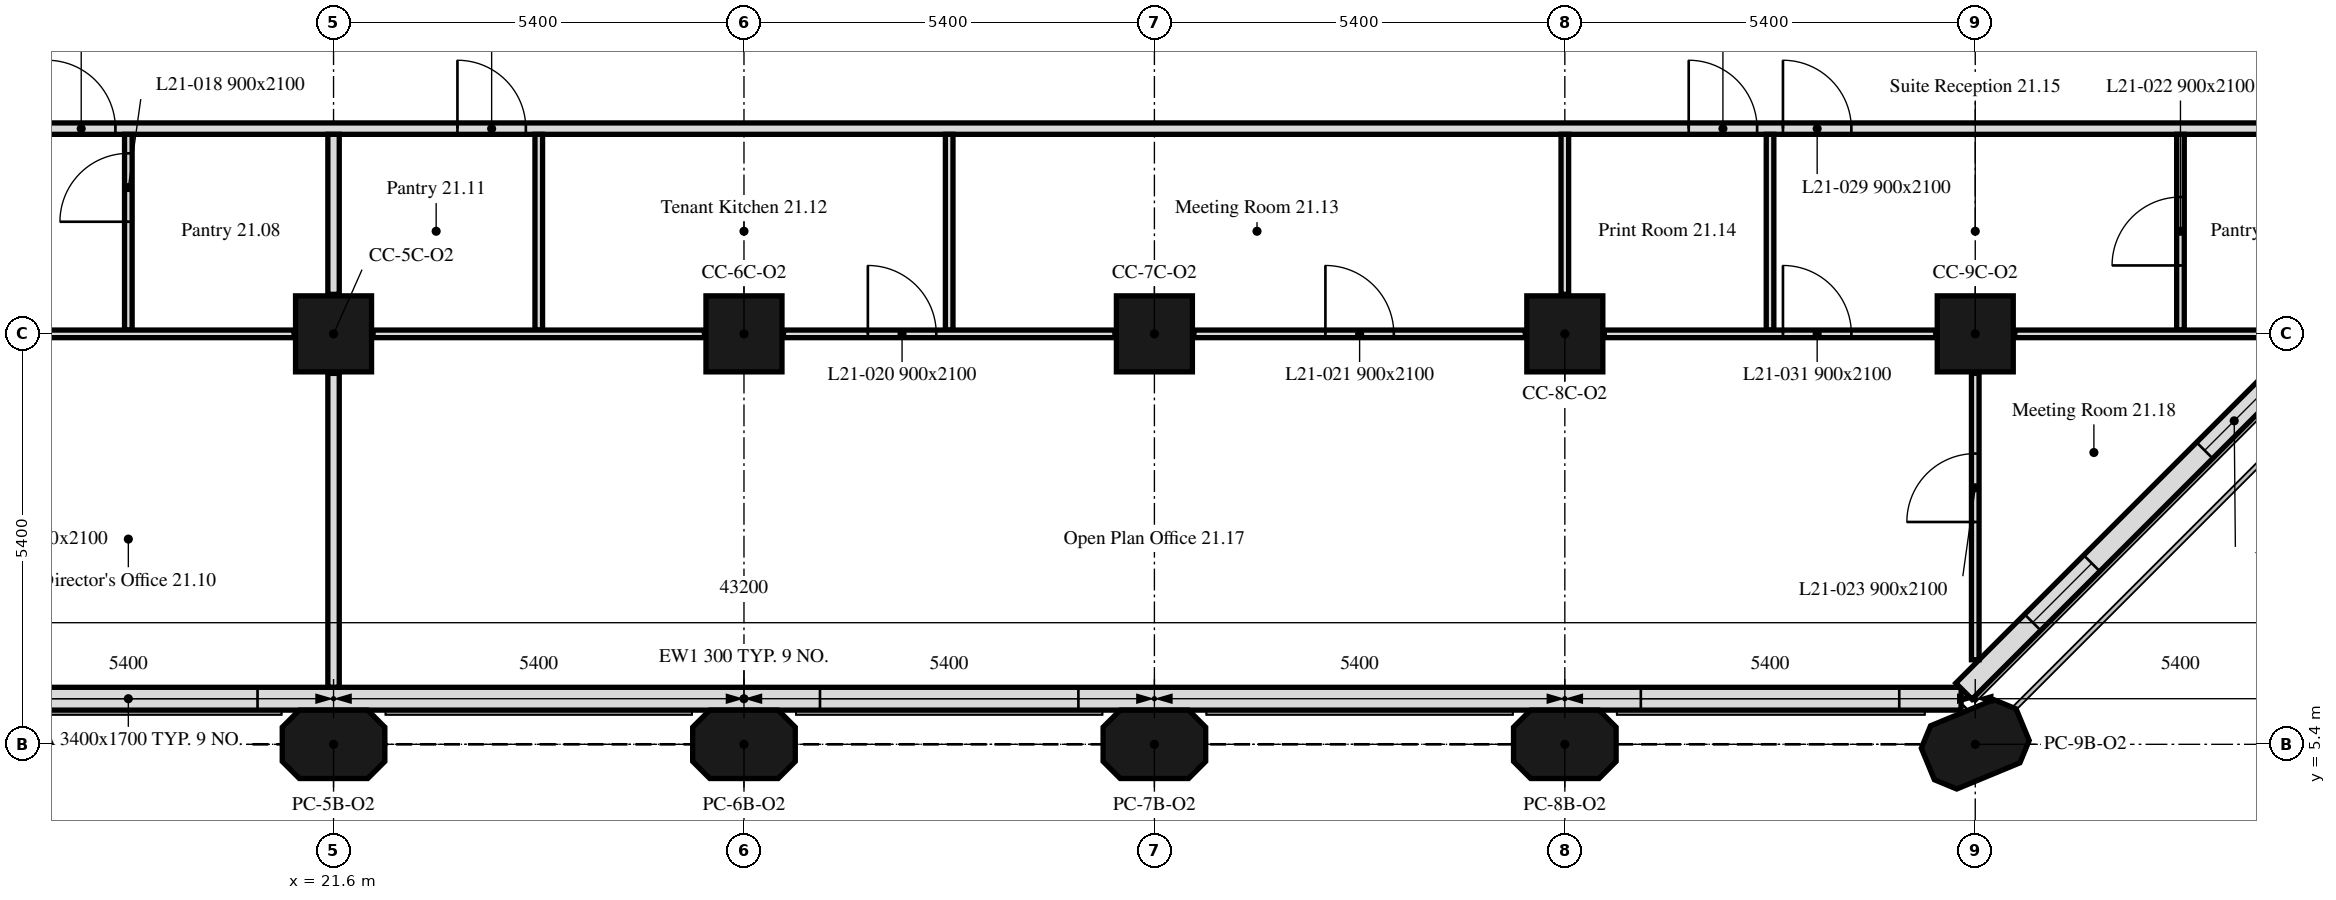
"""IFC4 building model, lengths in metres.
Left out: names, types, materials, properties, quantities, classifications, styles, units other than length and angle.
Written with IfcOpenShell. Run it as: python <this file> out.ifc"""

import sys

from ifc_helpers import new_model, si_unit, direction, frame, frame_2d, origin, origin_2d, place, context, subcontext, project, spatial, polyline, rectangle, outline, extrude, element, fill, save


model = new_model("IFC4")
c1 = context("Model", 3, precision=1e-05, world=origin(), true_north=direction((0.0, 1.0)))
c2 = subcontext(c1, "Body", "Model", "MODEL_VIEW")
j1 = project(units=[si_unit("LENGTHUNIT", "METRE"), si_unit("PLANEANGLEUNIT", "RADIAN")], contexts=[c1])
p1 = place(None, origin())
s1 = spatial("IfcSite", under=j1, at=p1, CompositionType="ELEMENT")
p2 = place(p1, origin())
s2 = spatial("IfcBuilding", under=s1, at=p2, CompositionType="ELEMENT")
p3 = place(p2, frame((0.0, 0.0, 91.6)))
s3 = spatial("IfcBuildingStorey", under=s2, at=p3, CompositionType="ELEMENT", Elevation=91.6)
for number, where, z_axis, x_axis in (
    (1, (21.6, 5.4, 0.0), (0.0, 0.0, 1.0), (1.0, 0.0, 0.0)),
    (2, (27.0, 5.4, 0.0), (0.0, 0.0, 1.0), (1.0, 0.0, 0.0)),
    (3, (32.4, 5.4, 0.0), (0.0, 0.0, 1.0), (1.0, 0.0, 0.0)),
    (4, (37.8, 5.4, 0.0), (0.0, 0.0, 1.0), (1.0, 0.0, 0.0)),
    (5, (43.2, 5.4, 0.0), (0.0, 0.0, 1.0), (0.924, 0.383, 0.0)),
):
    element("IfcColumn", number, at=place(p3, frame(where, z_axis=z_axis, x_axis=x_axis)), inside=s3, PredefinedType="COLUMN", context=c2, shape_type="SweptSolid", body=[
        extrude(outline(polyline([(-0.45, -0.45), (0.45, -0.45), (0.675, -0.225), (0.675, 0.225), (0.45, 0.45), (-0.45, 0.45), (-0.675, 0.225), (-0.675, -0.225), (-0.45, -0.45)])), origin(), (0.0, 0.0, 1.0), 3.5),
    ])
for number, where, z_axis, x_axis in (
    (6, (21.6, 10.8, 0.0), (0.0, 0.0, 1.0), (1.0, 0.0, 0.0)),
    (7, (27.0, 10.8, 0.0), (0.0, 0.0, 1.0), (1.0, 0.0, 0.0)),
    (8, (32.4, 10.8, 0.0), (0.0, 0.0, 1.0), (1.0, 0.0, 0.0)),
    (9, (37.8, 10.8, 0.0), (0.0, 0.0, 1.0), (1.0, 0.0, 0.0)),
    (10, (43.2, 10.8, 0.0), (0.0, 0.0, 1.0), (1.0, 0.0, 0.0)),
):
    element("IfcColumn", number, at=place(p3, frame(where, z_axis=z_axis, x_axis=x_axis)), inside=s3, PredefinedType="COLUMN", context=c2, shape_type="SweptSolid", body=[
        extrude(rectangle(XDim=1.0, YDim=1.0, at=origin_2d()), origin(), (0.0, 0.0, 1.0), 3.5),
    ])
p4 = place(p3, frame((10.986, 6.0, 0.0), z_axis=(0.0, 0.0, 1.0), x_axis=(1.0, 0.0, 0.0)))
e11 = element("IfcWall", 11, at=p4, inside=s3, PredefinedType="SOLIDWALL", context=c2, shape_type="SweptSolid", body=[
    extrude(rectangle(XDim=32.027, YDim=0.3, at=frame_2d((16.014, 0.0))), origin(), (0.0, 0.0, 1.0), 3.5),
])
p5 = place(p4, frame((6.214, 0.0, 0.9)))
e12 = element("IfcOpeningElement", 12, at=p5, cuts=e11, PredefinedType="OPENING", context=c2, shape_type="SweptSolid", body=[
    extrude(rectangle(XDim=3.4, YDim=1.7, at=frame_2d((1.7, 0.85))), frame((0.0, 0.16, 0.0), z_axis=(0.0, -1.0, 0.0), x_axis=(1.0, 0.0, 0.0)), (0.0, 0.0, 1.0), 0.32),
])
p6 = place(p4, frame((17.014, 0.0, 0.9)))
e13 = element("IfcOpeningElement", 13, at=p6, cuts=e11, PredefinedType="OPENING", context=c2, shape_type="SweptSolid", body=[
    extrude(rectangle(XDim=3.4, YDim=1.7, at=frame_2d((1.7, 0.85))), frame((0.0, 0.16, 0.0), z_axis=(0.0, -1.0, 0.0), x_axis=(1.0, 0.0, 0.0)), (0.0, 0.0, 1.0), 0.32),
])
p7 = place(p4, frame((27.814, 0.0, 0.9)))
e14 = element("IfcOpeningElement", 14, at=p7, cuts=e11, PredefinedType="OPENING", context=c2, shape_type="SweptSolid", body=[
    extrude(rectangle(XDim=3.4, YDim=1.7, at=frame_2d((1.7, 0.85))), frame((0.0, 0.16, 0.0), z_axis=(0.0, -1.0, 0.0), x_axis=(1.0, 0.0, 0.0)), (0.0, 0.0, 1.0), 0.32),
])
p8 = place(p3, frame((43.051, 6.099, 0.0), z_axis=(0.0, 0.0, 1.0), x_axis=(0.707106781187, 0.707106781187, 0.0)))
e15 = element("IfcWall", 15, at=p8, inside=s3, PredefinedType="SOLIDWALL", context=c2, shape_type="SweptSolid", body=[
    extrude(rectangle(XDim=6.86, YDim=0.3, at=frame_2d((3.43, 0.0))), origin(), (0.0, 0.0, 1.0), 3.5),
])
p9 = place(p8, frame((1.28, 0.0, 0.9)))
e16 = element("IfcOpeningElement", 16, at=p9, cuts=e15, PredefinedType="OPENING", context=c2, shape_type="SweptSolid", body=[
    extrude(rectangle(XDim=1.1, YDim=1.7, at=frame_2d((0.55, 0.85))), frame((0.0, 0.16, 0.0), z_axis=(0.0, -1.0, 0.0), x_axis=(1.0, 0.0, 0.0)), (0.0, 0.0, 1.0), 0.32),
])
p10 = place(p8, frame((4.48, 0.0, 0.9)))
e17 = element("IfcOpeningElement", 17, at=p10, cuts=e15, PredefinedType="OPENING", context=c2, shape_type="SweptSolid", body=[
    extrude(rectangle(XDim=1.1, YDim=1.7, at=frame_2d((0.55, 0.85))), frame((0.0, 0.16, 0.0), z_axis=(0.0, -1.0, 0.0), x_axis=(1.0, 0.0, 0.0)), (0.0, 0.0, 1.0), 0.32),
])
p11 = place(p3, frame((6.151, 13.5, 0.0), z_axis=(0.0, 0.0, 1.0), x_axis=(1.0, 0.0, 0.0)))
e18 = element("IfcWall", 18, at=p11, inside=s3, PredefinedType="PARTITIONING", context=c2, shape_type="SweptSolid", body=[
    extrude(rectangle(XDim=41.698, YDim=0.15, at=frame_2d((20.849, 0.0))), origin(), (0.0, 0.0, 1.0), 3.5),
])
p12 = place(p11, frame((0.879, 0.0, 0.0)))
e19 = element("IfcOpeningElement", 19, at=p12, cuts=e18, PredefinedType="OPENING", context=c2, shape_type="SweptSolid", body=[
    extrude(rectangle(XDim=0.9, YDim=2.1, at=frame_2d((0.45, 1.05))), frame((0.0, 0.075, 0.0), z_axis=(0.0, -1.0, 0.0), x_axis=(1.0, 0.0, 0.0)), (0.0, 0.0, 1.0), 0.15),
])
p13 = place(p11, frame((17.079, 0.0, 0.0)))
e20 = element("IfcOpeningElement", 20, at=p13, cuts=e18, PredefinedType="OPENING", context=c2, shape_type="SweptSolid", body=[
    extrude(rectangle(XDim=0.9, YDim=2.1, at=frame_2d((0.45, 1.05))), frame((0.0, 0.075, 0.0), z_axis=(0.0, -1.0, 0.0), x_axis=(1.0, 0.0, 0.0)), (0.0, 0.0, 1.0), 0.15),
])
p14 = place(p11, frame((33.279, 0.0, 0.0)))
e21 = element("IfcOpeningElement", 21, at=p14, cuts=e18, PredefinedType="OPENING", context=c2, shape_type="SweptSolid", body=[
    extrude(rectangle(XDim=0.9, YDim=2.1, at=frame_2d((0.45, 1.05))), frame((0.0, 0.075, 0.0), z_axis=(0.0, -1.0, 0.0), x_axis=(1.0, 0.0, 0.0)), (0.0, 0.0, 1.0), 0.15),
])
p15 = place(p11, frame((11.679, 0.0, 0.0)))
e22 = element("IfcOpeningElement", 22, at=p15, cuts=e18, PredefinedType="OPENING", context=c2, shape_type="SweptSolid", body=[
    extrude(rectangle(XDim=0.9, YDim=2.1, at=frame_2d((0.45, 1.05))), frame((0.0, 0.075, 0.0), z_axis=(0.0, -1.0, 0.0), x_axis=(1.0, 0.0, 0.0)), (0.0, 0.0, 1.0), 0.15),
])
p16 = place(p11, frame((34.519, 0.0, 0.0)))
e23 = element("IfcOpeningElement", 23, at=p16, cuts=e18, PredefinedType="OPENING", context=c2, shape_type="SweptSolid", body=[
    extrude(rectangle(XDim=0.9, YDim=2.1, at=frame_2d((0.45, 1.05))), frame((0.0, 0.075, 0.0), z_axis=(0.0, -1.0, 0.0), x_axis=(1.0, 0.0, 0.0)), (0.0, 0.0, 1.0), 0.15),
])
p17 = place(p3, frame((18.9, 10.85, 0.0), z_axis=(0.0, 0.0, 1.0), x_axis=(0.0, 1.0, 0.0)))
e24 = element("IfcWall", 24, at=p17, inside=s3, PredefinedType="PARTITIONING", context=c2, shape_type="SweptSolid", body=[
    extrude(rectangle(XDim=2.575, YDim=0.1, at=frame_2d((1.288, 0.0))), origin(), (0.0, 0.0, 1.0), 3.5),
])
p18 = place(p17, frame((1.425, 0.0, 0.0)))
e25 = element("IfcOpeningElement", 25, at=p18, cuts=e24, PredefinedType="OPENING", context=c2, shape_type="SweptSolid", body=[
    extrude(rectangle(XDim=0.9, YDim=2.1, at=frame_2d((0.45, 1.05))), frame((0.0, 0.05, 0.0), z_axis=(0.0, -1.0, 0.0), x_axis=(1.0, 0.0, 0.0)), (0.0, 0.0, 1.0), 0.1),
])
p19 = place(p3, frame((16.72, 10.8, 0.0), z_axis=(0.0, 0.0, 1.0), x_axis=(1.0, 0.0, 0.0)))
e26 = element("IfcWall", 26, at=p19, inside=s3, PredefinedType="PARTITIONING", context=c2, shape_type="SweptSolid", body=[
    extrude(rectangle(XDim=4.36, YDim=0.1, at=frame_2d((2.18, 0.0))), origin(), (0.0, 0.0, 1.0), 3.5),
])
p20 = place(p3, frame((21.6, 11.32, 0.0), z_axis=(0.0, 0.0, 1.0), x_axis=(0.0, 1.0, 0.0)))
e27 = element("IfcWall", 27, at=p20, inside=s3, PredefinedType="PARTITIONING", context=c2, shape_type="SweptSolid", body=[
    extrude(rectangle(XDim=2.105, YDim=0.15, at=frame_2d((1.052, 0.0))), origin(), (0.0, 0.0, 1.0), 3.5),
])
p21 = place(p3, frame((21.6, 6.151, 0.0), z_axis=(0.0, 0.0, 1.0), x_axis=(0.0, 1.0, 0.0)))
e28 = element("IfcWall", 28, at=p21, inside=s3, PredefinedType="PARTITIONING", context=c2, shape_type="SweptSolid", body=[
    extrude(rectangle(XDim=4.129, YDim=0.15, at=frame_2d((2.064, 0.0))), origin(), (0.0, 0.0, 1.0), 3.5),
])
p22 = place(p3, frame((24.3, 10.85, 0.0), z_axis=(0.0, 0.0, 1.0), x_axis=(0.0, 1.0, 0.0)))
e29 = element("IfcWall", 29, at=p22, inside=s3, PredefinedType="PARTITIONING", context=c2, shape_type="SweptSolid", body=[
    extrude(rectangle(XDim=2.575, YDim=0.1, at=frame_2d((1.288, 0.0))), origin(), (0.0, 0.0, 1.0), 3.5),
])
p23 = place(p3, frame((22.12, 10.8, 0.0), z_axis=(0.0, 0.0, 1.0), x_axis=(1.0, 0.0, 0.0)))
e30 = element("IfcWall", 30, at=p23, inside=s3, PredefinedType="PARTITIONING", context=c2, shape_type="SweptSolid", body=[
    extrude(rectangle(XDim=4.36, YDim=0.1, at=frame_2d((2.18, 0.0))), origin(), (0.0, 0.0, 1.0), 3.5),
])
p24 = place(p3, frame((29.7, 10.85, 0.0), z_axis=(0.0, 0.0, 1.0), x_axis=(0.0, 1.0, 0.0)))
e31 = element("IfcWall", 31, at=p24, inside=s3, PredefinedType="PARTITIONING", context=c2, shape_type="SweptSolid", body=[
    extrude(rectangle(XDim=2.575, YDim=0.1, at=frame_2d((1.288, 0.0))), origin(), (0.0, 0.0, 1.0), 3.5),
])
p25 = place(p3, frame((27.52, 10.8, 0.0), z_axis=(0.0, 0.0, 1.0), x_axis=(1.0, 0.0, 0.0)))
e32 = element("IfcWall", 32, at=p25, inside=s3, PredefinedType="PARTITIONING", context=c2, shape_type="SweptSolid", body=[
    extrude(rectangle(XDim=4.36, YDim=0.1, at=frame_2d((2.18, 0.0))), origin(), (0.0, 0.0, 1.0), 3.5),
])
p26 = place(p25, frame((1.11, 0.0, 0.0)))
e33 = element("IfcOpeningElement", 33, at=p26, cuts=e32, PredefinedType="OPENING", context=c2, shape_type="SweptSolid", body=[
    extrude(rectangle(XDim=0.9, YDim=2.1, at=frame_2d((0.45, 1.05))), frame((0.0, 0.05, 0.0), z_axis=(0.0, -1.0, 0.0), x_axis=(1.0, 0.0, 0.0)), (0.0, 0.0, 1.0), 0.1),
])
p27 = place(p3, frame((32.92, 10.8, 0.0), z_axis=(0.0, 0.0, 1.0), x_axis=(1.0, 0.0, 0.0)))
e34 = element("IfcWall", 34, at=p27, inside=s3, PredefinedType="PARTITIONING", context=c2, shape_type="SweptSolid", body=[
    extrude(rectangle(XDim=4.36, YDim=0.1, at=frame_2d((2.18, 0.0))), origin(), (0.0, 0.0, 1.0), 3.5),
])
p28 = place(p27, frame((1.73, 0.0, 0.0)))
e35 = element("IfcOpeningElement", 35, at=p28, cuts=e34, PredefinedType="OPENING", context=c2, shape_type="SweptSolid", body=[
    extrude(rectangle(XDim=0.9, YDim=2.1, at=frame_2d((0.45, 1.05))), frame((0.0, 0.05, 0.0), z_axis=(0.0, -1.0, 0.0), x_axis=(1.0, 0.0, 0.0)), (0.0, 0.0, 1.0), 0.1),
])
p29 = place(p3, frame((37.8, 11.32, 0.0), z_axis=(0.0, 0.0, 1.0), x_axis=(0.0, 1.0, 0.0)))
e36 = element("IfcWall", 36, at=p29, inside=s3, PredefinedType="PARTITIONING", context=c2, shape_type="SweptSolid", body=[
    extrude(rectangle(XDim=2.105, YDim=0.1, at=frame_2d((1.052, 0.0))), origin(), (0.0, 0.0, 1.0), 3.5),
])
p30 = place(p3, frame((40.5, 10.85, 0.0), z_axis=(0.0, 0.0, 1.0), x_axis=(0.0, 1.0, 0.0)))
e37 = element("IfcWall", 37, at=p30, inside=s3, PredefinedType="PARTITIONING", context=c2, shape_type="SweptSolid", body=[
    extrude(rectangle(XDim=2.575, YDim=0.1, at=frame_2d((1.288, 0.0))), origin(), (0.0, 0.0, 1.0), 3.5),
])
p31 = place(p3, frame((38.32, 10.8, 0.0), z_axis=(0.0, 0.0, 1.0), x_axis=(1.0, 0.0, 0.0)))
e38 = element("IfcWall", 38, at=p31, inside=s3, PredefinedType="PARTITIONING", context=c2, shape_type="SweptSolid", body=[
    extrude(rectangle(XDim=4.36, YDim=0.1, at=frame_2d((2.18, 0.0))), origin(), (0.0, 0.0, 1.0), 3.5),
])
p32 = place(p31, frame((2.35, 0.0, 0.0)))
e39 = element("IfcOpeningElement", 39, at=p32, cuts=e38, PredefinedType="OPENING", context=c2, shape_type="SweptSolid", body=[
    extrude(rectangle(XDim=0.9, YDim=2.1, at=frame_2d((0.45, 1.05))), frame((0.0, 0.05, 0.0), z_axis=(0.0, -1.0, 0.0), x_axis=(1.0, 0.0, 0.0)), (0.0, 0.0, 1.0), 0.1),
])
p33 = place(p3, frame((45.9, 10.85, 0.0), z_axis=(0.0, 0.0, 1.0), x_axis=(0.0, 1.0, 0.0)))
e40 = element("IfcWall", 40, at=p33, inside=s3, PredefinedType="PARTITIONING", context=c2, shape_type="SweptSolid", body=[
    extrude(rectangle(XDim=2.575, YDim=0.1, at=frame_2d((1.288, 0.0))), origin(), (0.0, 0.0, 1.0), 3.5),
])
p34 = place(p33, frame((0.85, 0.0, 0.0)))
e41 = element("IfcOpeningElement", 41, at=p34, cuts=e40, PredefinedType="OPENING", context=c2, shape_type="SweptSolid", body=[
    extrude(rectangle(XDim=0.9, YDim=2.1, at=frame_2d((0.45, 1.05))), frame((0.0, 0.05, 0.0), z_axis=(0.0, -1.0, 0.0), x_axis=(1.0, 0.0, 0.0)), (0.0, 0.0, 1.0), 0.1),
])
p35 = place(p3, frame((43.72, 10.8, 0.0), z_axis=(0.0, 0.0, 1.0), x_axis=(1.0, 0.0, 0.0)))
e42 = element("IfcWall", 42, at=p35, inside=s3, PredefinedType="PARTITIONING", context=c2, shape_type="SweptSolid", body=[
    extrude(rectangle(XDim=3.768, YDim=0.1, at=frame_2d((1.884, 0.0))), origin(), (0.0, 0.0, 1.0), 3.5),
])
p36 = place(p3, frame((43.2, 6.512, 0.0), z_axis=(0.0, 0.0, 1.0), x_axis=(0.0, 1.0, 0.0)))
e43 = element("IfcWall", 43, at=p36, inside=s3, PredefinedType="PARTITIONING", context=c2, shape_type="SweptSolid", body=[
    extrude(rectangle(XDim=3.768, YDim=0.1, at=frame_2d((1.884, 0.0))), origin(), (0.0, 0.0, 1.0), 3.5),
])
p37 = place(p36, frame((1.813, 0.0, 0.0)))
e44 = element("IfcOpeningElement", 44, at=p37, cuts=e43, PredefinedType="OPENING", context=c2, shape_type="SweptSolid", body=[
    extrude(rectangle(XDim=0.9, YDim=2.1, at=frame_2d((0.45, 1.05))), frame((0.0, 0.05, 0.0), z_axis=(0.0, -1.0, 0.0), x_axis=(1.0, 0.0, 0.0)), (0.0, 0.0, 1.0), 0.1),
])
p38 = place(p5, origin())
e45 = element("IfcWindow", 45, at=p38, inside=s3, PartitioningType="SINGLE_PANEL", PredefinedType="WINDOW", context=c2, shape_type="SweptSolid", body=[
    extrude(rectangle(XDim=3.4, YDim=1.7, at=frame_2d((1.7, 0.85))), frame((0.0, 0.03, 0.0), z_axis=(0.0, -1.0, 0.0), x_axis=(1.0, 0.0, 0.0)), (0.0, 0.0, 1.0), 0.06),
])
fill(e12, e45)
p39 = place(p6, origin())
e46 = element("IfcWindow", 46, at=p39, inside=s3, PartitioningType="SINGLE_PANEL", PredefinedType="WINDOW", context=c2, shape_type="SweptSolid", body=[
    extrude(rectangle(XDim=3.4, YDim=1.7, at=frame_2d((1.7, 0.85))), frame((0.0, 0.03, 0.0), z_axis=(0.0, -1.0, 0.0), x_axis=(1.0, 0.0, 0.0)), (0.0, 0.0, 1.0), 0.06),
])
fill(e13, e46)
p40 = place(p7, origin())
e47 = element("IfcWindow", 47, at=p40, inside=s3, PartitioningType="SINGLE_PANEL", PredefinedType="WINDOW", context=c2, shape_type="SweptSolid", body=[
    extrude(rectangle(XDim=3.4, YDim=1.7, at=frame_2d((1.7, 0.85))), frame((0.0, 0.03, 0.0), z_axis=(0.0, -1.0, 0.0), x_axis=(1.0, 0.0, 0.0)), (0.0, 0.0, 1.0), 0.06),
])
fill(e14, e47)
p41 = place(p9, origin())
e48 = element("IfcWindow", 48, at=p41, inside=s3, PartitioningType="SINGLE_PANEL", PredefinedType="WINDOW", context=c2, shape_type="SweptSolid", body=[
    extrude(rectangle(XDim=1.1, YDim=1.7, at=frame_2d((0.55, 0.85))), frame((0.0, 0.03, 0.0), z_axis=(0.0, -1.0, 0.0), x_axis=(1.0, 0.0, 0.0)), (0.0, 0.0, 1.0), 0.06),
])
fill(e16, e48)
p42 = place(p10, origin())
e49 = element("IfcWindow", 49, at=p42, inside=s3, PartitioningType="SINGLE_PANEL", PredefinedType="WINDOW", context=c2, shape_type="SweptSolid", body=[
    extrude(rectangle(XDim=1.1, YDim=1.7, at=frame_2d((0.55, 0.85))), frame((0.0, 0.03, 0.0), z_axis=(0.0, -1.0, 0.0), x_axis=(1.0, 0.0, 0.0)), (0.0, 0.0, 1.0), 0.06),
])
fill(e17, e49)
p43 = place(p13, origin())
e50 = element("IfcDoor", 50, at=p43, inside=s3, OperationType="SINGLE_SWING_RIGHT", PredefinedType="DOOR", context=c2, shape_type="SweptSolid", body=[
    extrude(rectangle(XDim=0.9, YDim=2.1, at=frame_2d((0.45, 1.05))), frame((0.0, 0.025, 0.0), z_axis=(0.0, -1.0, 0.0), x_axis=(1.0, 0.0, 0.0)), (0.0, 0.0, 1.0), 0.05),
])
fill(e20, e50)
p44 = place(p14, origin())
e51 = element("IfcDoor", 51, at=p44, inside=s3, OperationType="SINGLE_SWING_RIGHT", PredefinedType="DOOR", context=c2, shape_type="SweptSolid", body=[
    extrude(rectangle(XDim=0.9, YDim=2.1, at=frame_2d((0.45, 1.05))), frame((0.0, 0.025, 0.0), z_axis=(0.0, -1.0, 0.0), x_axis=(1.0, 0.0, 0.0)), (0.0, 0.0, 1.0), 0.05),
])
fill(e21, e51)
p45 = place(p18, origin())
e52 = element("IfcDoor", 52, at=p45, inside=s3, OperationType="SINGLE_SWING_RIGHT", PredefinedType="DOOR", context=c2, shape_type="SweptSolid", body=[
    extrude(rectangle(XDim=0.9, YDim=2.1, at=frame_2d((0.45, 1.05))), frame((0.0, 0.025, 0.0), z_axis=(0.0, -1.0, 0.0), x_axis=(1.0, 0.0, 0.0)), (0.0, 0.0, 1.0), 0.05),
])
fill(e25, e52)
p46 = place(p26, origin())
e53 = element("IfcDoor", 53, at=p46, inside=s3, OperationType="SINGLE_SWING_LEFT", PredefinedType="DOOR", context=c2, shape_type="SweptSolid", body=[
    extrude(rectangle(XDim=0.9, YDim=2.1, at=frame_2d((0.45, 1.05))), frame((0.0, 0.025, 0.0), z_axis=(0.0, -1.0, 0.0), x_axis=(1.0, 0.0, 0.0)), (0.0, 0.0, 1.0), 0.05),
])
fill(e33, e53)
p47 = place(p28, origin())
e54 = element("IfcDoor", 54, at=p47, inside=s3, OperationType="SINGLE_SWING_LEFT", PredefinedType="DOOR", context=c2, shape_type="SweptSolid", body=[
    extrude(rectangle(XDim=0.9, YDim=2.1, at=frame_2d((0.45, 1.05))), frame((0.0, 0.025, 0.0), z_axis=(0.0, -1.0, 0.0), x_axis=(1.0, 0.0, 0.0)), (0.0, 0.0, 1.0), 0.05),
])
fill(e35, e54)
p48 = place(p34, origin())
e55 = element("IfcDoor", 55, at=p48, inside=s3, OperationType="SINGLE_SWING_LEFT", PredefinedType="DOOR", context=c2, shape_type="SweptSolid", body=[
    extrude(rectangle(XDim=0.9, YDim=2.1, at=frame_2d((0.45, 1.05))), frame((0.0, 0.025, 0.0), z_axis=(0.0, -1.0, 0.0), x_axis=(1.0, 0.0, 0.0)), (0.0, 0.0, 1.0), 0.05),
])
fill(e41, e55)
p49 = place(p37, origin())
e56 = element("IfcDoor", 56, at=p49, inside=s3, OperationType="SINGLE_SWING_RIGHT", PredefinedType="DOOR", context=c2, shape_type="SweptSolid", body=[
    extrude(rectangle(XDim=0.9, YDim=2.1, at=frame_2d((0.45, 1.05))), frame((0.0, 0.025, 0.0), z_axis=(0.0, -1.0, 0.0), x_axis=(1.0, 0.0, 0.0)), (0.0, 0.0, 1.0), 0.05),
])
fill(e44, e56)
p50 = place(p15, origin())
e57 = element("IfcDoor", 57, at=p50, inside=s3, OperationType="SINGLE_SWING_RIGHT", PredefinedType="DOOR", context=c2, shape_type="SweptSolid", body=[
    extrude(rectangle(XDim=0.9, YDim=2.1, at=frame_2d((0.45, 1.05))), frame((0.0, 0.025, 0.0), z_axis=(0.0, -1.0, 0.0), x_axis=(1.0, 0.0, 0.0)), (0.0, 0.0, 1.0), 0.05),
])
fill(e22, e57)
p51 = place(p16, origin())
e58 = element("IfcDoor", 58, at=p51, inside=s3, OperationType="SINGLE_SWING_LEFT", PredefinedType="DOOR", context=c2, shape_type="SweptSolid", body=[
    extrude(rectangle(XDim=0.9, YDim=2.1, at=frame_2d((0.45, 1.05))), frame((0.0, 0.025, 0.0), z_axis=(0.0, -1.0, 0.0), x_axis=(1.0, 0.0, 0.0)), (0.0, 0.0, 1.0), 0.05),
])
fill(e23, e58)
p52 = place(p32, origin())
e59 = element("IfcDoor", 59, at=p52, inside=s3, OperationType="SINGLE_SWING_LEFT", PredefinedType="DOOR", context=c2, shape_type="SweptSolid", body=[
    extrude(rectangle(XDim=0.9, YDim=2.1, at=frame_2d((0.45, 1.05))), frame((0.0, 0.025, 0.0), z_axis=(0.0, -1.0, 0.0), x_axis=(1.0, 0.0, 0.0)), (0.0, 0.0, 1.0), 0.05),
])
fill(e39, e59)
save(model, sys.argv[1])
